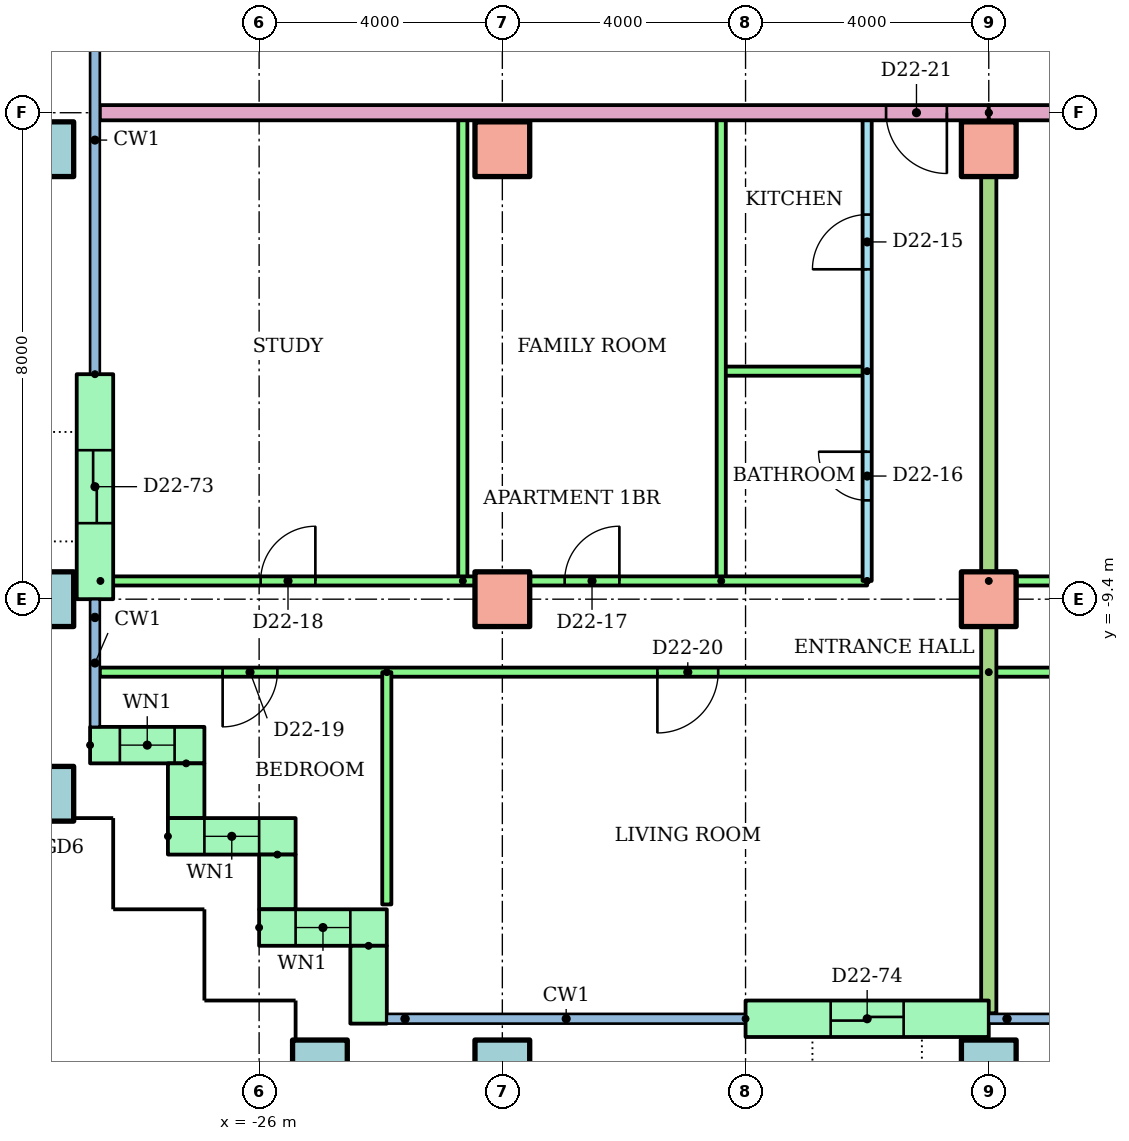
"""IFC4 building model, lengths in metres.
Left out: names, types, materials, properties, quantities, classifications, styles, units other than length and angle.
Written with IfcOpenShell. Run it as: python <this file> out.ifc"""

import sys

from ifc_helpers import new_model, si_unit, direction, frame, frame_2d, origin, origin_2d, place, context, subcontext, project, spatial, rectangle, hollow_rectangle, extrude, element, fill, save


model = new_model("IFC4")
c1 = context("Model", 3, precision=1e-05, world=origin(), true_north=direction((0.0, 1.0)))
c2 = subcontext(c1, "Body", "Model", "MODEL_VIEW")
j1 = project(units=[si_unit("LENGTHUNIT", "METRE"), si_unit("PLANEANGLEUNIT", "RADIAN")], contexts=[c1])
p1 = place(None, origin())
s1 = spatial("IfcSite", under=j1, at=p1, CompositionType="ELEMENT")
p2 = place(p1, origin())
s2 = spatial("IfcBuilding", under=s1, at=p2, CompositionType="ELEMENT")
p3 = place(p2, frame((0.0, 0.0, 87.1)))
s3 = spatial("IfcBuildingStorey", under=s2, at=p3, CompositionType="ELEMENT", Elevation=87.1)
for number, where in (
    (1, (-25.0, -17.1, 0.0)),
    (2, (-22.0, -17.1, 0.0)),
    (3, (-14.0, -17.1, 0.0)),
    (4, (-29.5, -12.6, 0.0)),
    (5, (-29.5, -9.4, 0.0)),
):
    element("IfcColumn", number, at=place(p3, frame(where)), inside=s3, PredefinedType="COLUMN", context=c2, shape_type="SweptSolid", body=[
        extrude(hollow_rectangle(XDim=0.9, YDim=0.9, WallThickness=0.045, at=origin_2d()), origin(), (0.0, 0.0, 1.0), 3.2),
    ])
for number, where in (
    (6, (-22.0, -9.4, 0.0)),
    (7, (-14.0, -9.4, 0.0)),
):
    element("IfcColumn", number, at=place(p3, frame(where)), inside=s3, PredefinedType="COLUMN", context=c2, shape_type="SweptSolid", body=[
        extrude(rectangle(XDim=0.9, YDim=0.9, at=origin_2d()), origin(), (0.0, 0.0, 1.0), 3.2),
    ])
p4 = place(p3, frame((-29.5, -2.0, 0.0)))
e8 = element("IfcColumn", 8, at=p4, inside=s3, PredefinedType="COLUMN", context=c2, shape_type="SweptSolid", body=[
    extrude(hollow_rectangle(XDim=0.9, YDim=0.9, WallThickness=0.045, at=origin_2d()), origin(), (0.0, 0.0, 1.0), 3.2),
])
for number, where in (
    (9, (-22.0, -2.0, 0.0)),
    (10, (-14.0, -2.0, 0.0)),
):
    element("IfcColumn", number, at=place(p3, frame(where)), inside=s3, PredefinedType="COLUMN", context=c2, shape_type="SweptSolid", body=[
        extrude(rectangle(XDim=0.9, YDim=0.9, at=origin_2d()), origin(), (0.0, 0.0, 1.0), 3.2),
    ])
p5 = place(p3, frame((-28.7, -5.7, 0.0), z_axis=(0.0, 0.0, 1.0), x_axis=(0.0, -1.0, 0.0)))
e11 = element("IfcWall", 11, at=p5, inside=s3, PredefinedType="STANDARD", context=c2, shape_type="SweptSolid", body=[
    extrude(rectangle(XDim=3.7, YDim=0.6, at=frame_2d((1.85, 0.0))), origin(), (0.0, 0.0, 1.0), 2.92),
])
p6 = place(p5, frame((1.25, 0.0, 0.0)))
e12 = element("IfcOpeningElement", 12, at=p6, cuts=e11, PredefinedType="OPENING", context=c2, shape_type="SweptSolid", body=[
    extrude(rectangle(XDim=1.2, YDim=2.1, at=frame_2d((0.6, 1.05))), frame((0.0, 0.31, 0.0), z_axis=(0.0, -1.0, 0.0), x_axis=(1.0, 0.0, 0.0)), (0.0, 0.0, 1.0), 0.62),
])
p7 = place(p3, frame((-28.78, -11.8, 0.0)))
e13 = element("IfcWall", 13, at=p7, inside=s3, PredefinedType="STANDARD", context=c2, shape_type="SweptSolid", body=[
    extrude(rectangle(XDim=1.88, YDim=0.6, at=frame_2d((0.94, 0.0))), origin(), (0.0, 0.0, 1.0), 2.92),
])
p8 = place(p7, frame((0.49, 0.0, 0.9)))
e14 = element("IfcOpeningElement", 14, at=p8, cuts=e13, PredefinedType="OPENING", context=c2, shape_type="SweptSolid", body=[
    extrude(rectangle(XDim=0.9, YDim=1.5, at=frame_2d((0.45, 0.75))), frame((0.0, 0.31, 0.0), z_axis=(0.0, -1.0, 0.0), x_axis=(1.0, 0.0, 0.0)), (0.0, 0.0, 1.0), 0.62),
])
p9 = place(p3, frame((-27.2, -12.1, 0.0), z_axis=(0.0, 0.0, 1.0), x_axis=(0.0, -1.0, 0.0)))
e15 = element("IfcWall", 15, at=p9, inside=s3, PredefinedType="STANDARD", context=c2, shape_type="SweptSolid", body=[
    extrude(rectangle(XDim=0.9, YDim=0.6, at=frame_2d((0.45, 0.0))), origin(), (0.0, 0.0, 1.0), 2.92),
])
p10 = place(p3, frame((-27.5, -13.3, 0.0)))
e16 = element("IfcWall", 16, at=p10, inside=s3, PredefinedType="STANDARD", context=c2, shape_type="SweptSolid", body=[
    extrude(rectangle(XDim=2.1, YDim=0.6, at=frame_2d((1.05, 0.0))), origin(), (0.0, 0.0, 1.0), 2.92),
])
p11 = place(p10, frame((0.6, 0.0, 0.9)))
e17 = element("IfcOpeningElement", 17, at=p11, cuts=e16, PredefinedType="OPENING", context=c2, shape_type="SweptSolid", body=[
    extrude(rectangle(XDim=0.9, YDim=1.5, at=frame_2d((0.45, 0.75))), frame((0.0, 0.31, 0.0), z_axis=(0.0, -1.0, 0.0), x_axis=(1.0, 0.0, 0.0)), (0.0, 0.0, 1.0), 0.62),
])
p12 = place(p3, frame((-25.7, -13.6, 0.0), z_axis=(0.0, 0.0, 1.0), x_axis=(0.0, -1.0, 0.0)))
e18 = element("IfcWall", 18, at=p12, inside=s3, PredefinedType="STANDARD", context=c2, shape_type="SweptSolid", body=[
    extrude(rectangle(XDim=0.9, YDim=0.6, at=frame_2d((0.45, 0.0))), origin(), (0.0, 0.0, 1.0), 2.92),
])
p13 = place(p3, frame((-26.0, -14.8, 0.0)))
e19 = element("IfcWall", 19, at=p13, inside=s3, PredefinedType="STANDARD", context=c2, shape_type="SweptSolid", body=[
    extrude(rectangle(XDim=2.1, YDim=0.6, at=frame_2d((1.05, 0.0))), origin(), (0.0, 0.0, 1.0), 2.92),
])
p14 = place(p13, frame((0.6, 0.0, 0.9)))
e20 = element("IfcOpeningElement", 20, at=p14, cuts=e19, PredefinedType="OPENING", context=c2, shape_type="SweptSolid", body=[
    extrude(rectangle(XDim=0.9, YDim=1.5, at=frame_2d((0.45, 0.75))), frame((0.0, 0.31, 0.0), z_axis=(0.0, -1.0, 0.0), x_axis=(1.0, 0.0, 0.0)), (0.0, 0.0, 1.0), 0.62),
])
p15 = place(p3, frame((-24.2, -15.1, 0.0), z_axis=(0.0, 0.0, 1.0), x_axis=(0.0, -1.0, 0.0)))
e21 = element("IfcWall", 21, at=p15, inside=s3, PredefinedType="STANDARD", context=c2, shape_type="SweptSolid", body=[
    extrude(rectangle(XDim=1.28, YDim=0.6, at=frame_2d((0.64, 0.0))), origin(), (0.0, 0.0, 1.0), 2.92),
])
p16 = place(p3, frame((-18.0, -16.3, 0.0)))
e22 = element("IfcWall", 22, at=p16, inside=s3, PredefinedType="STANDARD", context=c2, shape_type="SweptSolid", body=[
    extrude(rectangle(XDim=4.0, YDim=0.6, at=frame_2d((2.0, 0.0))), origin(), (0.0, 0.0, 1.0), 2.92),
])
p17 = place(p16, frame((1.4, 0.0, 0.0)))
e23 = element("IfcOpeningElement", 23, at=p17, cuts=e22, PredefinedType="OPENING", context=c2, shape_type="SweptSolid", body=[
    extrude(rectangle(XDim=1.2, YDim=2.1, at=frame_2d((0.6, 1.05))), frame((0.0, 0.31, 0.0), z_axis=(0.0, -1.0, 0.0), x_axis=(1.0, 0.0, 0.0)), (0.0, 0.0, 1.0), 0.62),
])
p18 = place(p3, frame((-16.0, -9.1, 0.0), z_axis=(0.0, 0.0, 1.0), x_axis=(0.0, 1.0, 0.0)))
e24 = element("IfcWall", 24, at=p18, inside=s3, PredefinedType="PARTITIONING", context=c2, shape_type="SweptSolid", body=[
    extrude(rectangle(XDim=7.7, YDim=0.15, at=frame_2d((3.85, 0.0))), origin(), (0.0, 0.0, 1.0), 2.4),
])
p19 = place(p18, frame((5.125, 0.0, 0.0)))
e25 = element("IfcOpeningElement", 25, at=p19, cuts=e24, PredefinedType="OPENING", context=c2, shape_type="SweptSolid", body=[
    extrude(rectangle(XDim=0.9, YDim=2.1, at=frame_2d((0.45, 1.05))), frame((0.0, 0.085, 0.0), z_axis=(0.0, -1.0, 0.0), x_axis=(1.0, 0.0, 0.0)), (0.0, 0.0, 1.0), 0.17),
])
p20 = place(p18, frame((1.325, 0.0, 0.0)))
e26 = element("IfcOpeningElement", 26, at=p20, cuts=e24, PredefinedType="OPENING", context=c2, shape_type="SweptSolid", body=[
    extrude(rectangle(XDim=0.8, YDim=2.1, at=frame_2d((0.4, 1.05))), frame((0.0, 0.085, 0.0), z_axis=(0.0, -1.0, 0.0), x_axis=(1.0, 0.0, 0.0)), (0.0, 0.0, 1.0), 0.17),
])
p21 = place(p3, frame((-16.0, -5.65, 0.0), z_axis=(0.0, 0.0, 1.0), x_axis=(-1.0, 0.0, 0.0)))
e27 = element("IfcWall", 27, at=p21, inside=s3, PredefinedType="PARTITIONING", context=c2, shape_type="SweptSolid", body=[
    extrude(rectangle(XDim=2.4, YDim=0.15, at=frame_2d((1.2, 0.0))), origin(), (0.0, 0.0, 1.0), 2.4),
])
for number, where, z_axis, x_axis in (
    (28, (-18.4, -9.1, 0.0), (0.0, 0.0, 1.0), (0.0, 1.0, 0.0)),
    (29, (-22.65, -9.1, 0.0), (0.0, 0.0, 1.0), (0.0, 1.0, 0.0)),
):
    element("IfcWall", number, at=place(p3, frame(where, z_axis=z_axis, x_axis=x_axis)), inside=s3, PredefinedType="PARTITIONING", context=c2, shape_type="SweptSolid", body=[
        extrude(rectangle(XDim=7.7, YDim=0.15, at=frame_2d((3.85, 0.0))), origin(), (0.0, 0.0, 1.0), 2.4),
    ])
p22 = place(p3, frame((-28.61, -9.1, 0.0)))
e30 = element("IfcWall", 30, at=p22, inside=s3, PredefinedType="PARTITIONING", context=c2, shape_type="SweptSolid", body=[
    extrude(rectangle(XDim=12.61, YDim=0.15, at=frame_2d((6.305, 0.0))), origin(), (0.0, 0.0, 1.0), 2.4),
])
p23 = place(p22, frame((7.635, 0.0, 0.0)))
e31 = element("IfcOpeningElement", 31, at=p23, cuts=e30, PredefinedType="OPENING", context=c2, shape_type="SweptSolid", body=[
    extrude(rectangle(XDim=0.9, YDim=2.1, at=frame_2d((0.45, 1.05))), frame((0.0, 0.085, 0.0), z_axis=(0.0, -1.0, 0.0), x_axis=(1.0, 0.0, 0.0)), (0.0, 0.0, 1.0), 0.17),
])
p24 = place(p22, frame((2.635, 0.0, 0.0)))
e32 = element("IfcOpeningElement", 32, at=p24, cuts=e30, PredefinedType="OPENING", context=c2, shape_type="SweptSolid", body=[
    extrude(rectangle(XDim=0.9, YDim=2.1, at=frame_2d((0.45, 1.05))), frame((0.0, 0.085, 0.0), z_axis=(0.0, -1.0, 0.0), x_axis=(1.0, 0.0, 0.0)), (0.0, 0.0, 1.0), 0.17),
])
p25 = place(p3, frame((-14.0, -10.6, 0.0), z_axis=(0.0, 0.0, 1.0), x_axis=(-1.0, 0.0, 0.0)))
e33 = element("IfcWall", 33, at=p25, inside=s3, PredefinedType="PARTITIONING", context=c2, shape_type="SweptSolid", body=[
    extrude(rectangle(XDim=14.62, YDim=0.15, at=frame_2d((7.31, 0.0))), origin(), (0.0, 0.0, 1.0), 2.4),
])
p26 = place(p25, frame((11.7, 0.0, 0.0)))
e34 = element("IfcOpeningElement", 34, at=p26, cuts=e33, PredefinedType="OPENING", context=c2, shape_type="SweptSolid", body=[
    extrude(rectangle(XDim=0.9, YDim=2.1, at=frame_2d((0.45, 1.05))), frame((0.0, 0.085, 0.0), z_axis=(0.0, -1.0, 0.0), x_axis=(1.0, 0.0, 0.0)), (0.0, 0.0, 1.0), 0.17),
])
p27 = place(p25, frame((4.45, 0.0, 0.0)))
e35 = element("IfcOpeningElement", 35, at=p27, cuts=e33, PredefinedType="OPENING", context=c2, shape_type="SweptSolid", body=[
    extrude(rectangle(XDim=1.0, YDim=2.1, at=frame_2d((0.5, 1.05))), frame((0.0, 0.085, 0.0), z_axis=(0.0, -1.0, 0.0), x_axis=(1.0, 0.0, 0.0)), (0.0, 0.0, 1.0), 0.17),
])
p28 = place(p3, frame((-23.9, -10.6, 0.0), z_axis=(0.0, 0.0, 1.0), x_axis=(0.0, -1.0, 0.0)))
e36 = element("IfcWall", 36, at=p28, inside=s3, PredefinedType="PARTITIONING", context=c2, shape_type="SweptSolid", body=[
    extrude(rectangle(XDim=3.82, YDim=0.15, at=frame_2d((1.91, 0.0))), origin(), (0.0, 0.0, 1.0), 2.4),
])
p29 = place(p3, frame((-14.0, -9.1, 0.0)))
e37 = element("IfcWall", 37, at=p29, inside=s3, PredefinedType="PARTITIONING", context=c2, shape_type="SweptSolid", body=[
    extrude(rectangle(XDim=14.0, YDim=0.15, at=frame_2d((7.0, 0.0))), origin(), (0.0, 0.0, 1.0), 2.4),
])
p30 = place(p29, frame((9.65, 0.0, 0.0)))
e38 = element("IfcOpeningElement", 38, at=p30, cuts=e37, PredefinedType="OPENING", context=c2, shape_type="SweptSolid", body=[
    extrude(rectangle(XDim=0.9, YDim=2.1, at=frame_2d((0.45, 1.05))), frame((0.0, 0.085, 0.0), z_axis=(0.0, -1.0, 0.0), x_axis=(1.0, 0.0, 0.0)), (0.0, 0.0, 1.0), 0.17),
])
p31 = place(p29, frame((6.275, 0.0, 0.0)))
e39 = element("IfcOpeningElement", 39, at=p31, cuts=e37, PredefinedType="OPENING", context=c2, shape_type="SweptSolid", body=[
    extrude(rectangle(XDim=0.9, YDim=2.1, at=frame_2d((0.45, 1.05))), frame((0.0, 0.085, 0.0), z_axis=(0.0, -1.0, 0.0), x_axis=(1.0, 0.0, 0.0)), (0.0, 0.0, 1.0), 0.17),
])
p32 = place(p29, frame((1.975, 0.0, 0.0)))
e40 = element("IfcOpeningElement", 40, at=p32, cuts=e37, PredefinedType="OPENING", context=c2, shape_type="SweptSolid", body=[
    extrude(rectangle(XDim=0.9, YDim=2.1, at=frame_2d((0.45, 1.05))), frame((0.0, 0.085, 0.0), z_axis=(0.0, -1.0, 0.0), x_axis=(1.0, 0.0, 0.0)), (0.0, 0.0, 1.0), 0.17),
])
p33 = place(p3, frame((2.0, -10.6, 0.0), z_axis=(0.0, 0.0, 1.0), x_axis=(-1.0, 0.0, 0.0)))
e41 = element("IfcWall", 41, at=p33, inside=s3, PredefinedType="PARTITIONING", context=c2, shape_type="SweptSolid", body=[
    extrude(rectangle(XDim=16.0, YDim=0.15, at=frame_2d((8.0, 0.0))), origin(), (0.0, 0.0, 1.0), 2.4),
])
p34 = place(p33, frame((13.55, 0.0, 0.0)))
e42 = element("IfcOpeningElement", 42, at=p34, cuts=e41, PredefinedType="OPENING", context=c2, shape_type="SweptSolid", body=[
    extrude(rectangle(XDim=0.9, YDim=2.1, at=frame_2d((0.45, 1.05))), frame((0.0, 0.085, 0.0), z_axis=(0.0, -1.0, 0.0), x_axis=(1.0, 0.0, 0.0)), (0.0, 0.0, 1.0), 0.17),
])
p35 = place(p33, frame((9.55, 0.0, 0.0)))
e43 = element("IfcOpeningElement", 43, at=p35, cuts=e41, PredefinedType="OPENING", context=c2, shape_type="SweptSolid", body=[
    extrude(rectangle(XDim=0.9, YDim=2.1, at=frame_2d((0.45, 1.05))), frame((0.0, 0.085, 0.0), z_axis=(0.0, -1.0, 0.0), x_axis=(1.0, 0.0, 0.0)), (0.0, 0.0, 1.0), 0.17),
])
p36 = place(p33, frame((3.5, 0.0, 0.0)))
e44 = element("IfcOpeningElement", 44, at=p36, cuts=e41, PredefinedType="OPENING", context=c2, shape_type="SweptSolid", body=[
    extrude(rectangle(XDim=1.0, YDim=2.1, at=frame_2d((0.5, 1.05))), frame((0.0, 0.085, 0.0), z_axis=(0.0, -1.0, 0.0), x_axis=(1.0, 0.0, 0.0)), (0.0, 0.0, 1.0), 0.17),
])
p37 = place(p3, frame((-14.0, -1.4, 0.0), z_axis=(0.0, 0.0, 1.0), x_axis=(0.0, -1.0, 0.0)))
e45 = element("IfcWall", 45, at=p37, inside=s3, PredefinedType="PARTITIONING", context=c2, shape_type="SweptSolid", body=[
    extrude(rectangle(XDim=14.81, YDim=0.25, at=frame_2d((7.405, 0.0))), origin(), (0.0, 0.0, 1.0), 2.4),
])
p38 = place(p3, frame((-14.0, -1.4, 0.0), z_axis=(0.0, 0.0, 1.0), x_axis=(-1.0, 0.0, 0.0)))
e46 = element("IfcWall", 46, at=p38, inside=s3, PredefinedType="PARTITIONING", context=c2, shape_type="SweptSolid", body=[
    extrude(rectangle(XDim=14.62, YDim=0.25, at=frame_2d((7.31, 0.0))), origin(), (0.0, 0.0, 1.0), 2.4),
])
p39 = place(p38, frame((0.689, 0.0, 0.0)))
e47 = element("IfcOpeningElement", 47, at=p39, cuts=e46, PredefinedType="OPENING", context=c2, shape_type="SweptSolid", body=[
    extrude(rectangle(XDim=1.0, YDim=2.1, at=frame_2d((0.5, 1.05))), frame((0.0, 0.135, 0.0), z_axis=(0.0, -1.0, 0.0), x_axis=(1.0, 0.0, 0.0)), (0.0, 0.0, 1.0), 0.27),
])
p40 = place(p3, frame((14.0, -1.4, 0.0), z_axis=(0.0, 0.0, 1.0), x_axis=(-1.0, 0.0, 0.0)))
e48 = element("IfcWall", 48, at=p40, inside=s3, PredefinedType="PARTITIONING", context=c2, shape_type="SweptSolid", body=[
    extrude(rectangle(XDim=28.0, YDim=0.25, at=frame_2d((14.0, 0.0))), origin(), (0.0, 0.0, 1.0), 2.4),
])
p41 = place(p40, frame((12.689, 0.0, 0.0)))
e49 = element("IfcOpeningElement", 49, at=p41, cuts=e48, PredefinedType="OPENING", context=c2, shape_type="SweptSolid", body=[
    extrude(rectangle(XDim=1.0, YDim=2.1, at=frame_2d((0.5, 1.05))), frame((0.0, 0.135, 0.0), z_axis=(0.0, -1.0, 0.0), x_axis=(1.0, 0.0, 0.0)), (0.0, 0.0, 1.0), 0.27),
])
p42 = place(p40, frame((10.311, 0.0, 0.0)))
e50 = element("IfcOpeningElement", 50, at=p42, cuts=e48, PredefinedType="OPENING", context=c2, shape_type="SweptSolid", body=[
    extrude(rectangle(XDim=1.0, YDim=2.1, at=frame_2d((0.5, 1.05))), frame((0.0, 0.135, 0.0), z_axis=(0.0, -1.0, 0.0), x_axis=(1.0, 0.0, 0.0)), (0.0, 0.0, 1.0), 0.27),
])
p43 = place(p8, origin())
e51 = element("IfcWindow", 51, at=p43, inside=s3, PartitioningType="SINGLE_PANEL", PredefinedType="WINDOW", context=c2, shape_type="SweptSolid", body=[
    extrude(rectangle(XDim=0.9, YDim=1.5, at=frame_2d((0.45, 0.75))), frame((0.0, 0.03, 0.0), z_axis=(0.0, -1.0, 0.0), x_axis=(1.0, 0.0, 0.0)), (0.0, 0.0, 1.0), 0.06),
])
fill(e14, e51)
p44 = place(p11, origin())
e52 = element("IfcWindow", 52, at=p44, inside=s3, PartitioningType="SINGLE_PANEL", PredefinedType="WINDOW", context=c2, shape_type="SweptSolid", body=[
    extrude(rectangle(XDim=0.9, YDim=1.5, at=frame_2d((0.45, 0.75))), frame((0.0, 0.03, 0.0), z_axis=(0.0, -1.0, 0.0), x_axis=(1.0, 0.0, 0.0)), (0.0, 0.0, 1.0), 0.06),
])
fill(e17, e52)
p45 = place(p14, origin())
e53 = element("IfcWindow", 53, at=p45, inside=s3, PartitioningType="SINGLE_PANEL", PredefinedType="WINDOW", context=c2, shape_type="SweptSolid", body=[
    extrude(rectangle(XDim=0.9, YDim=1.5, at=frame_2d((0.45, 0.75))), frame((0.0, 0.03, 0.0), z_axis=(0.0, -1.0, 0.0), x_axis=(1.0, 0.0, 0.0)), (0.0, 0.0, 1.0), 0.06),
])
fill(e20, e53)
p46 = place(p19, origin())
e54 = element("IfcDoor", 54, at=p46, inside=s3, OperationType="SINGLE_SWING_LEFT", PredefinedType="DOOR", context=c2, shape_type="SweptSolid", body=[
    extrude(rectangle(XDim=0.9, YDim=2.1, at=frame_2d((0.45, 1.05))), frame((0.0, 0.025, 0.0), z_axis=(0.0, -1.0, 0.0), x_axis=(1.0, 0.0, 0.0)), (0.0, 0.0, 1.0), 0.05),
])
fill(e25, e54)
p47 = place(p20, origin())
e55 = element("IfcDoor", 55, at=p47, inside=s3, OperationType="SINGLE_SWING_RIGHT", PredefinedType="DOOR", context=c2, shape_type="SweptSolid", body=[
    extrude(rectangle(XDim=0.8, YDim=2.1, at=frame_2d((0.4, 1.05))), frame((0.0, 0.025, 0.0), z_axis=(0.0, -1.0, 0.0), x_axis=(1.0, 0.0, 0.0)), (0.0, 0.0, 1.0), 0.05),
])
fill(e26, e55)
p48 = place(p23, origin())
e56 = element("IfcDoor", 56, at=p48, inside=s3, OperationType="SINGLE_SWING_RIGHT", PredefinedType="DOOR", context=c2, shape_type="SweptSolid", body=[
    extrude(rectangle(XDim=0.9, YDim=2.1, at=frame_2d((0.45, 1.05))), frame((0.0, 0.025, 0.0), z_axis=(0.0, -1.0, 0.0), x_axis=(1.0, 0.0, 0.0)), (0.0, 0.0, 1.0), 0.05),
])
fill(e31, e56)
p49 = place(p24, origin())
e57 = element("IfcDoor", 57, at=p49, inside=s3, OperationType="SINGLE_SWING_RIGHT", PredefinedType="DOOR", context=c2, shape_type="SweptSolid", body=[
    extrude(rectangle(XDim=0.9, YDim=2.1, at=frame_2d((0.45, 1.05))), frame((0.0, 0.025, 0.0), z_axis=(0.0, -1.0, 0.0), x_axis=(1.0, 0.0, 0.0)), (0.0, 0.0, 1.0), 0.05),
])
fill(e32, e57)
p50 = place(p26, origin())
e58 = element("IfcDoor", 58, at=p50, inside=s3, OperationType="SINGLE_SWING_RIGHT", PredefinedType="DOOR", context=c2, shape_type="SweptSolid", body=[
    extrude(rectangle(XDim=0.9, YDim=2.1, at=frame_2d((0.45, 1.05))), frame((0.0, 0.025, 0.0), z_axis=(0.0, -1.0, 0.0), x_axis=(1.0, 0.0, 0.0)), (0.0, 0.0, 1.0), 0.05),
])
fill(e34, e58)
p51 = place(p27, origin())
e59 = element("IfcDoor", 59, at=p51, inside=s3, OperationType="SINGLE_SWING_RIGHT", PredefinedType="DOOR", context=c2, shape_type="SweptSolid", body=[
    extrude(rectangle(XDim=1.0, YDim=2.1, at=frame_2d((0.5, 1.05))), frame((0.0, 0.025, 0.0), z_axis=(0.0, -1.0, 0.0), x_axis=(1.0, 0.0, 0.0)), (0.0, 0.0, 1.0), 0.05),
])
fill(e35, e59)
p52 = place(p39, origin())
e60 = element("IfcDoor", 60, at=p52, inside=s3, OperationType="SINGLE_SWING_LEFT", PredefinedType="DOOR", context=c2, shape_type="SweptSolid", body=[
    extrude(rectangle(XDim=1.0, YDim=2.1, at=frame_2d((0.5, 1.05))), frame((0.0, 0.025, 0.0), z_axis=(0.0, -1.0, 0.0), x_axis=(1.0, 0.0, 0.0)), (0.0, 0.0, 1.0), 0.05),
])
fill(e47, e60)
p53 = place(p6, origin())
e61 = element("IfcDoor", 61, at=p53, inside=s3, OperationType="SLIDING_TO_LEFT", PredefinedType="DOOR", context=c2, shape_type="SweptSolid", body=[
    extrude(rectangle(XDim=1.2, YDim=2.1, at=frame_2d((0.6, 1.05))), frame((0.0, 0.025, 0.0), z_axis=(0.0, -1.0, 0.0), x_axis=(1.0, 0.0, 0.0)), (0.0, 0.0, 1.0), 0.05),
])
fill(e12, e61)
p54 = place(p17, origin())
e62 = element("IfcDoor", 62, at=p54, inside=s3, OperationType="SLIDING_TO_LEFT", PredefinedType="DOOR", context=c2, shape_type="SweptSolid", body=[
    extrude(rectangle(XDim=1.2, YDim=2.1, at=frame_2d((0.6, 1.05))), frame((0.0, 0.025, 0.0), z_axis=(0.0, -1.0, 0.0), x_axis=(1.0, 0.0, 0.0)), (0.0, 0.0, 1.0), 0.05),
])
fill(e23, e62)
save(model, sys.argv[1])
